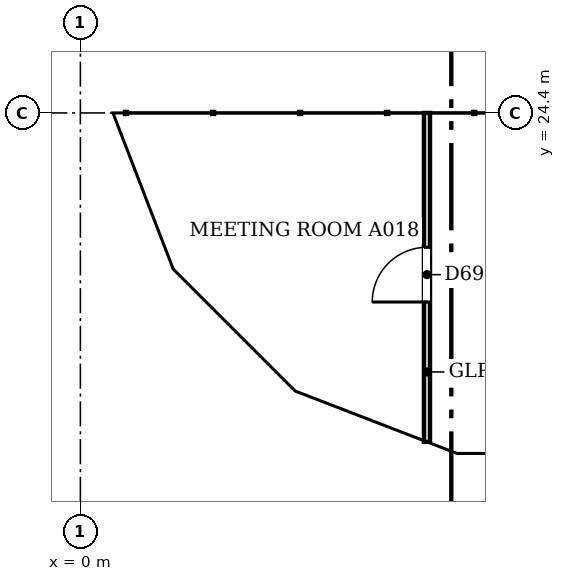
"""IFC4 building model, lengths in metres.
Left out: names, types, materials, properties, quantities, classifications, styles, units other than length and angle.
Written with IfcOpenShell. Run it as: python <this file> out.ifc"""

import sys

from ifc_helpers import new_model, si_unit, direction, frame, frame_2d, origin, place, context, subcontext, project, spatial, polyline, rectangle, outline, extrude, faceted_brep, source, transform, mapped, element, fill, save


model = new_model("IFC4")
c1 = context("Model", 3, precision=1e-05, world=origin(), true_north=direction((0.0, 1.0)))
c2 = subcontext(c1, "Body", "Model", "MODEL_VIEW")
j1 = project(units=[si_unit("LENGTHUNIT", "METRE"), si_unit("PLANEANGLEUNIT", "RADIAN")], contexts=[c1])
p1 = place(None, origin())
s1 = spatial("IfcSite", under=j1, at=p1, CompositionType="ELEMENT")
p2 = place(p1, origin())
s2 = spatial("IfcBuilding", under=s1, at=p2, CompositionType="ELEMENT")
p3 = place(p2, frame((0.0, 0.0, 166.8)))
s3 = spatial("IfcBuildingStorey", under=s2, at=p3, CompositionType="ELEMENT", Elevation=166.8)
m1 = source(origin(), c2, "Body", "Brep", [
    faceted_brep([(3.003, -0.25, 0.0), (3.05, -0.25, 0.06), (3.05, -0.25, 7.54), (3.003, -0.25, 7.6), (0.0, -0.25, 3.8), (0.0, 0.25, 3.8), (2.957, 0.25, 7.541), (2.957, 0.25, 0.059), (3.003, 0.0, 0.0), (3.003, 0.0, 7.6)], [[[0, 1, 2, 3, 4]], [[5, 6, 7]], [[1, 0, 8]], [[9, 3, 2]], [[6, 5, 4, 3, 9]], [[5, 7, 8, 0, 4]], [[1, 8, 7, 6, 9, 2]]]),
])
p4 = place(p3, frame((0.25, 27.45, -3.8), z_axis=(0.0, 0.0, 1.0), x_axis=(0.0, -1.0, 0.0)))
e1 = element("IfcWall", 1, at=p4, inside=s3, PredefinedType="SOLIDWALL", context=c2, shape_type="MappedRepresentation", body=[
    mapped(m1, transform((0.0, 0.0, 0.0), scale=1.0)),
])
m2 = source(origin(), c2, "Body", "SweptSolid", [
    extrude(outline(polyline([(2.803, 6.944), (0.319, 3.8), (2.803, 0.656), (2.803, 6.944)])), frame((0.0, 0.26, 0.0), z_axis=(0.0, -1.0, 0.0), x_axis=(1.0, 0.0, 0.0)), (0.0, 0.0, 1.0), 0.52),
])
p5 = place(p4, origin())
e2 = element("IfcOpeningElement", 2, at=p5, cuts=e1, PredefinedType="OPENING", context=c2, shape_type="MappedRepresentation", body=[
    mapped(m2, transform((0.0, 0.0, 0.0), scale=1.0)),
])
m3 = source(origin(), c2, "Body", "Brep", [
    faceted_brep([(0.047, -0.25, 0.0), (2.997, -0.25, 3.8), (0.047, -0.25, 7.6), (0.0, -0.25, 7.541), (0.0, -0.25, 0.059), (0.093, 0.25, 7.54), (2.944, 0.25, 3.868), (2.944, 0.25, 3.732), (0.093, 0.25, 0.06), (2.997, 0.0, 3.8), (0.047, 0.0, 0.0), (0.047, 0.0, 7.6)], [[[0, 1, 2, 3, 4]], [[5, 6, 7, 8]], [[8, 7, 9, 1, 0, 10]], [[6, 5, 11, 2, 1, 9]], [[3, 2, 11]], [[10, 0, 4]], [[8, 10, 4, 3, 11, 5]], [[9, 7, 6]]]),
])
p6 = place(p3, frame((0.233, 24.49, -3.8), z_axis=(0.0, 0.0, 1.0), x_axis=(0.359901446078, -0.932990326376, 0.0)))
e3 = element("IfcWall", 3, at=p6, inside=s3, PredefinedType="SOLIDWALL", context=c2, shape_type="MappedRepresentation", body=[
    mapped(m3, transform((0.0, 0.0, 0.0), scale=1.0)),
])
m4 = source(origin(), c2, "Body", "SweptSolid", [
    extrude(outline(polyline([(0.247, 0.665), (2.681, 3.8), (0.247, 6.935), (0.247, 0.665)])), frame((0.0, 0.26, 0.0), z_axis=(0.0, -1.0, 0.0), x_axis=(1.0, 0.0, 0.0)), (0.0, 0.0, 1.0), 0.52),
])
p7 = place(p6, origin())
e4 = element("IfcOpeningElement", 4, at=p7, cuts=e3, PredefinedType="OPENING", context=c2, shape_type="MappedRepresentation", body=[
    mapped(m4, transform((0.0, 0.0, 0.0), scale=1.0)),
])
m5 = source(origin(), c2, "Body", "Brep", [
    faceted_brep([(2.944, -0.25, 0.0), (2.997, -0.25, 0.068), (2.997, -0.25, 7.532), (2.944, -0.25, 7.6), (0.0, -0.25, 3.8), (0.053, 0.25, 3.868), (2.891, 0.25, 7.532), (2.891, 0.25, 0.068), (0.053, 0.25, 3.732), (2.944, 0.0, 0.0), (2.944, 0.0, 7.6), (0.0, 0.0, 3.8)], [[[0, 1, 2, 3, 4]], [[5, 6, 7, 8]], [[1, 0, 9]], [[10, 3, 2]], [[6, 5, 11, 4, 3, 10]], [[8, 7, 9, 0, 4, 11]], [[8, 11, 5]], [[1, 9, 7, 6, 10, 2]]]),
])
p8 = place(p3, frame((1.312, 21.694, -3.8), z_axis=(0.0, 0.0, 1.0), x_axis=(0.707066050402, -0.707147509625, 0.0)))
e5 = element("IfcWall", 5, at=p8, inside=s3, PredefinedType="SOLIDWALL", context=c2, shape_type="MappedRepresentation", body=[
    mapped(m5, transform((0.0, 0.0, 0.0), scale=1.0)),
])
m6 = source(origin(), c2, "Body", "SweptSolid", [
    extrude(outline(polyline([(2.744, 6.934), (0.316, 3.8), (2.744, 0.666), (2.744, 6.934)])), frame((0.0, 0.26, 0.0), z_axis=(0.0, -1.0, 0.0), x_axis=(1.0, 0.0, 0.0)), (0.0, 0.0, 1.0), 0.52),
])
p9 = place(p8, origin())
e6 = element("IfcOpeningElement", 6, at=p9, cuts=e5, PredefinedType="OPENING", context=c2, shape_type="MappedRepresentation", body=[
    mapped(m6, transform((0.0, 0.0, 0.0), scale=1.0)),
])
m7 = source(origin(), c2, "Body", "Brep", [
    faceted_brep([(0.053, -0.25, 0.0), (3.003, -0.25, 3.8), (0.053, -0.25, 7.6), (0.0, -0.25, 7.532), (0.0, -0.25, 0.068), (0.106, 0.25, 7.532), (2.957, 0.25, 3.86), (2.957, 0.25, 3.74), (0.106, 0.25, 0.068), (3.003, 0.0, 3.8), (0.053, 0.0, 0.0), (0.053, 0.0, 7.6)], [[[0, 1, 2, 3, 4]], [[5, 6, 7, 8]], [[8, 7, 9, 1, 0, 10]], [[6, 5, 11, 2, 1, 9]], [[3, 2, 11]], [[10, 0, 4]], [[8, 10, 4, 3, 11, 5]], [[9, 7, 6]]]),
])
p10 = place(p3, frame((3.344, 19.631, -3.8), z_axis=(0.0, 0.0, 1.0), x_axis=(0.933007896601, -0.359855894603, 0.0)))
e7 = element("IfcWall", 7, at=p10, inside=s3, PredefinedType="SOLIDWALL", context=c2, shape_type="MappedRepresentation", body=[
    mapped(m7, transform((0.0, 0.0, 0.0), scale=1.0)),
])
m8 = source(origin(), c2, "Body", "SweptSolid", [
    extrude(outline(polyline([(0.253, 0.665), (2.687, 3.8), (0.253, 6.935), (0.253, 0.665)])), frame((0.0, 0.26, 0.0), z_axis=(0.0, -1.0, 0.0), x_axis=(1.0, 0.0, 0.0)), (0.0, 0.0, 1.0), 0.52),
])
p11 = place(p10, origin())
e8 = element("IfcOpeningElement", 8, at=p11, cuts=e7, PredefinedType="OPENING", context=c2, shape_type="MappedRepresentation", body=[
    mapped(m8, transform((0.0, 0.0, 0.0), scale=1.0)),
])
m9 = source(origin(), c2, "Body", "Brep", [
    faceted_brep([(3.003, -0.25, 0.0), (6.053, -0.25, 3.8), (3.003, -0.25, 7.6), (0.0, -0.25, 3.8), (0.047, 0.25, 3.859), (3.003, 0.25, 7.6), (6.053, 0.25, 3.8), (3.003, 0.25, 0.0), (0.047, 0.25, 3.741), (0.0, 0.0, 3.8)], [[[0, 1, 2, 3]], [[4, 5, 6, 7, 8]], [[7, 6, 1, 0]], [[6, 5, 2, 1]], [[5, 4, 9, 3, 2]], [[8, 7, 0, 3, 9]], [[8, 9, 4]]]),
])
p12 = place(p3, frame((6.146, 18.55, -3.8), z_axis=(0.0, 0.0, 1.0), x_axis=(1.0, 0.0, 0.0)))
e9 = element("IfcWall", 9, at=p12, inside=s3, PredefinedType="SOLIDWALL", context=c2, shape_type="MappedRepresentation", body=[
    mapped(m9, transform((0.0, 0.0, 0.0), scale=1.0)),
])
m10 = source(origin(), c2, "Body", "SweptSolid", [
    extrude(outline(polyline([(3.005, 0.401), (5.733, 3.8), (3.005, 7.199), (0.319, 3.8), (3.005, 0.401)])), frame((0.0, 0.26, 0.0), z_axis=(0.0, -1.0, 0.0), x_axis=(1.0, 0.0, 0.0)), (0.0, 0.0, 1.0), 0.52),
])
p13 = place(p12, origin())
e10 = element("IfcOpeningElement", 10, at=p13, cuts=e9, PredefinedType="OPENING", context=c2, shape_type="MappedRepresentation", body=[
    mapped(m10, transform((0.0, 0.0, 0.0), scale=1.0)),
])
p14 = place(p2, frame((0.0, 0.0, 170.6)))
s4 = spatial("IfcBuildingStorey", under=s2, at=p14, CompositionType="ELEMENT", Elevation=170.6)
m11 = source(origin(), c2, "Body", "Brep", [
    faceted_brep([(3.05, -0.25, 0.0), (6.053, -0.25, 3.8), (3.05, -0.25, 7.6), (0.0, -0.25, 3.8), (0.0, 0.25, 3.8), (3.05, 0.25, 7.6), (6.007, 0.25, 3.859), (6.007, 0.25, 3.741), (3.05, 0.25, 0.0), (6.053, 0.0, 3.8)], [[[0, 1, 2, 3]], [[4, 5, 6, 7, 8]], [[8, 7, 9, 1, 0]], [[6, 5, 2, 1, 9]], [[5, 4, 3, 2]], [[4, 8, 0, 3]], [[7, 6, 9]]]),
])
p15 = place(p14, frame((0.25, 30.5, -3.8), z_axis=(0.0, 0.0, 1.0), x_axis=(0.0, -1.0, 0.0)))
e11 = element("IfcWall", 11, at=p15, inside=s4, PredefinedType="SOLIDWALL", context=c2, shape_type="MappedRepresentation", body=[
    mapped(m11, transform((0.0, 0.0, 0.0), scale=1.0)),
])
m12 = source(origin(), c2, "Body", "SweptSolid", [
    extrude(outline(polyline([(3.049, 0.401), (5.735, 3.8), (3.049, 7.199), (0.321, 3.8), (3.049, 0.401)])), frame((0.0, 0.26, 0.0), z_axis=(0.0, -1.0, 0.0), x_axis=(1.0, 0.0, 0.0)), (0.0, 0.0, 1.0), 0.52),
])
p16 = place(p15, origin())
e12 = element("IfcOpeningElement", 12, at=p16, cuts=e11, PredefinedType="OPENING", context=c2, shape_type="MappedRepresentation", body=[
    mapped(m12, transform((0.0, 0.0, 0.0), scale=1.0)),
])
m13 = source(origin(), c2, "Body", "Brep", [
    faceted_brep([(2.95, -0.25, 0.0), (3.003, -0.25, 0.068), (3.003, -0.25, 7.531), (2.95, -0.25, 7.6), (0.0, -0.25, 3.8), (0.047, 0.25, 3.86), (2.898, 0.25, 7.532), (2.898, 0.25, 0.068), (0.047, 0.25, 3.74), (2.95, 0.0, 0.0), (2.95, 0.0, 7.6), (0.0, 0.0, 3.8)], [[[0, 1, 2, 3, 4]], [[5, 6, 7, 8]], [[1, 0, 9]], [[10, 3, 2]], [[6, 5, 11, 4, 3, 10]], [[8, 7, 9, 0, 4, 11]], [[8, 11, 5]], [[1, 9, 7, 6, 10, 2]]]),
])
p17 = place(p14, frame((0.25, 24.447, -3.8), z_axis=(0.0, 0.0, 1.0), x_axis=(0.35992665181, -0.932980602862, 0.0)))
e13 = element("IfcWall", 13, at=p17, inside=s4, PredefinedType="SOLIDWALL", context=c2, shape_type="MappedRepresentation", body=[
    mapped(m13, transform((0.0, 0.0, 0.0), scale=1.0)),
])
m14 = source(origin(), c2, "Body", "SweptSolid", [
    extrude(outline(polyline([(2.75, 6.935), (0.316, 3.8), (2.75, 0.665), (2.75, 6.935)])), frame((0.0, 0.26, 0.0), z_axis=(0.0, -1.0, 0.0), x_axis=(1.0, 0.0, 0.0)), (0.0, 0.0, 1.0), 0.52),
])
p18 = place(p17, origin())
e14 = element("IfcOpeningElement", 14, at=p18, cuts=e13, PredefinedType="OPENING", context=c2, shape_type="MappedRepresentation", body=[
    mapped(m14, transform((0.0, 0.0, 0.0), scale=1.0)),
])
m15 = source(origin(), c2, "Body", "Brep", [
    faceted_brep([(0.053, -0.25, 0.0), (2.997, -0.25, 3.8), (0.053, -0.25, 7.6), (0.0, -0.25, 7.532), (0.0, -0.25, 0.068), (0.106, 0.25, 7.531), (2.944, 0.25, 3.868), (2.944, 0.25, 3.732), (0.106, 0.25, 0.068), (2.997, 0.0, 3.8), (0.053, 0.0, 0.0), (0.053, 0.0, 7.6)], [[[0, 1, 2, 3, 4]], [[5, 6, 7, 8]], [[8, 7, 9, 1, 0, 10]], [[6, 5, 11, 2, 1, 9]], [[3, 2, 11]], [[10, 0, 4]], [[8, 10, 4, 3, 11, 5]], [[7, 6, 9]]]),
])
p19 = place(p14, frame((1.274, 21.731, -3.8), z_axis=(0.0, 0.0, 1.0), x_axis=(0.707147509625, -0.707066050402, 0.0)))
e15 = element("IfcWall", 15, at=p19, inside=s4, PredefinedType="SOLIDWALL", context=c2, shape_type="MappedRepresentation", body=[
    mapped(m15, transform((0.0, 0.0, 0.0), scale=1.0)),
])
m16 = source(origin(), c2, "Body", "SweptSolid", [
    extrude(outline(polyline([(0.253, 0.666), (2.681, 3.8), (0.253, 6.934), (0.253, 0.666)])), frame((0.0, 0.26, 0.0), z_axis=(0.0, -1.0, 0.0), x_axis=(1.0, 0.0, 0.0)), (0.0, 0.0, 1.0), 0.52),
])
p20 = place(p19, origin())
e16 = element("IfcOpeningElement", 16, at=p20, cuts=e15, PredefinedType="OPENING", context=c2, shape_type="MappedRepresentation", body=[
    mapped(m16, transform((0.0, 0.0, 0.0), scale=1.0)),
])
m17 = source(origin(), c2, "Body", "Brep", [
    faceted_brep([(2.95, -0.25, 0.0), (2.997, -0.25, 0.059), (2.997, -0.25, 7.541), (2.95, -0.25, 7.6), (0.0, -0.25, 3.8), (0.053, 0.25, 3.868), (2.904, 0.25, 7.54), (2.904, 0.25, 0.06), (0.053, 0.25, 3.732), (2.95, 0.0, 0.0), (2.95, 0.0, 7.6), (0.0, 0.0, 3.8)], [[[0, 1, 2, 3, 4]], [[5, 6, 7, 8]], [[1, 0, 9]], [[10, 3, 2]], [[6, 5, 11, 4, 3, 10]], [[8, 7, 9, 0, 4, 11]], [[8, 11, 5]], [[1, 9, 7, 6, 10, 2]]]),
])
p21 = place(p14, frame((3.394, 19.612, -3.8), z_axis=(0.0, 0.0, 1.0), x_axis=(0.932990326376, -0.359901446078, 0.0)))
e17 = element("IfcWall", 17, at=p21, inside=s4, PredefinedType="SOLIDWALL", context=c2, shape_type="MappedRepresentation", body=[
    mapped(m17, transform((0.0, 0.0, 0.0), scale=1.0)),
])
p22 = place(p21, origin())
e18 = element("IfcOpeningElement", 18, at=p22, cuts=e17, PredefinedType="OPENING", context=c2, shape_type="MappedRepresentation", body=[
    mapped(m14, transform((0.0, 0.0, 0.0), scale=1.0)),
])
m18 = source(origin(), c2, "Body", "Brep", [
    faceted_brep([(0.047, -0.25, 0.0), (3.05, -0.25, 3.8), (0.047, -0.25, 7.6), (0.0, -0.25, 7.54), (0.0, -0.25, 0.06), (0.093, 0.25, 7.541), (3.05, 0.25, 3.8), (0.093, 0.25, 0.059), (0.047, 0.0, 0.0), (0.047, 0.0, 7.6)], [[[0, 1, 2, 3, 4]], [[5, 6, 7]], [[7, 6, 1, 0, 8]], [[6, 5, 9, 2, 1]], [[3, 2, 9]], [[8, 0, 4]], [[7, 8, 4, 3, 9, 5]]]),
])
p23 = place(p14, frame((6.1, 18.55, -3.8), z_axis=(0.0, 0.0, 1.0), x_axis=(1.0, 0.0, 0.0)))
e19 = element("IfcWall", 19, at=p23, inside=s4, PredefinedType="SOLIDWALL", context=c2, shape_type="MappedRepresentation", body=[
    mapped(m18, transform((0.0, 0.0, 0.0), scale=1.0)),
])
m19 = source(origin(), c2, "Body", "SweptSolid", [
    extrude(outline(polyline([(0.247, 0.656), (2.731, 3.8), (0.247, 6.944), (0.247, 0.656)])), frame((0.0, 0.26, 0.0), z_axis=(0.0, -1.0, 0.0), x_axis=(1.0, 0.0, 0.0)), (0.0, 0.0, 1.0), 0.52),
])
p24 = place(p23, origin())
e20 = element("IfcOpeningElement", 20, at=p24, cuts=e19, PredefinedType="OPENING", context=c2, shape_type="MappedRepresentation", body=[
    mapped(m19, transform((0.0, 0.0, 0.0), scale=1.0)),
])
p25 = place(p3, frame((5.7, 18.99, 0.0), z_axis=(0.0, 0.0, 1.0), x_axis=(0.0, 1.0, 0.0)))
e21 = element("IfcWall", 21, at=p25, inside=s3, PredefinedType="PARTITIONING", context=c2, shape_type="SweptSolid", body=[
    extrude(rectangle(XDim=5.41, YDim=0.1, at=frame_2d((2.705, 0.0))), origin(), (0.0, 0.0, 1.0), 3.067),
])
m20 = source(origin(), c2, "Body", "SweptSolid", [
    extrude(rectangle(XDim=0.9, YDim=2.1, at=frame_2d((0.45, 1.05))), frame((0.0, 0.06, 0.0), z_axis=(0.0, -1.0, 0.0), x_axis=(1.0, 0.0, 0.0)), (0.0, 0.0, 1.0), 0.12),
])
p26 = place(p25, frame((2.3, 0.0, 0.0)))
e22 = element("IfcOpeningElement", 22, at=p26, cuts=e21, PredefinedType="OPENING", context=c2, shape_type="MappedRepresentation", body=[
    mapped(m20, transform((0.0, 0.0, 0.0), scale=1.0)),
])
m21 = source(origin(), c2, "Body", "SweptSolid", [
    extrude(rectangle(XDim=0.9, YDim=2.1, at=frame_2d((0.45, 1.05))), frame((0.0, 0.025, 0.0), z_axis=(0.0, -1.0, 0.0), x_axis=(1.0, 0.0, 0.0)), (0.0, 0.0, 1.0), 0.05),
])
p27 = place(p26, origin())
e23 = element("IfcDoor", 23, at=p27, inside=s3, OperationType="SINGLE_SWING_LEFT", PredefinedType="DOOR", context=c2, shape_type="MappedRepresentation", body=[
    mapped(m21, transform((0.0, 0.0, 0.0), scale=1.0)),
])
fill(e22, e23)
save(model, sys.argv[1])
